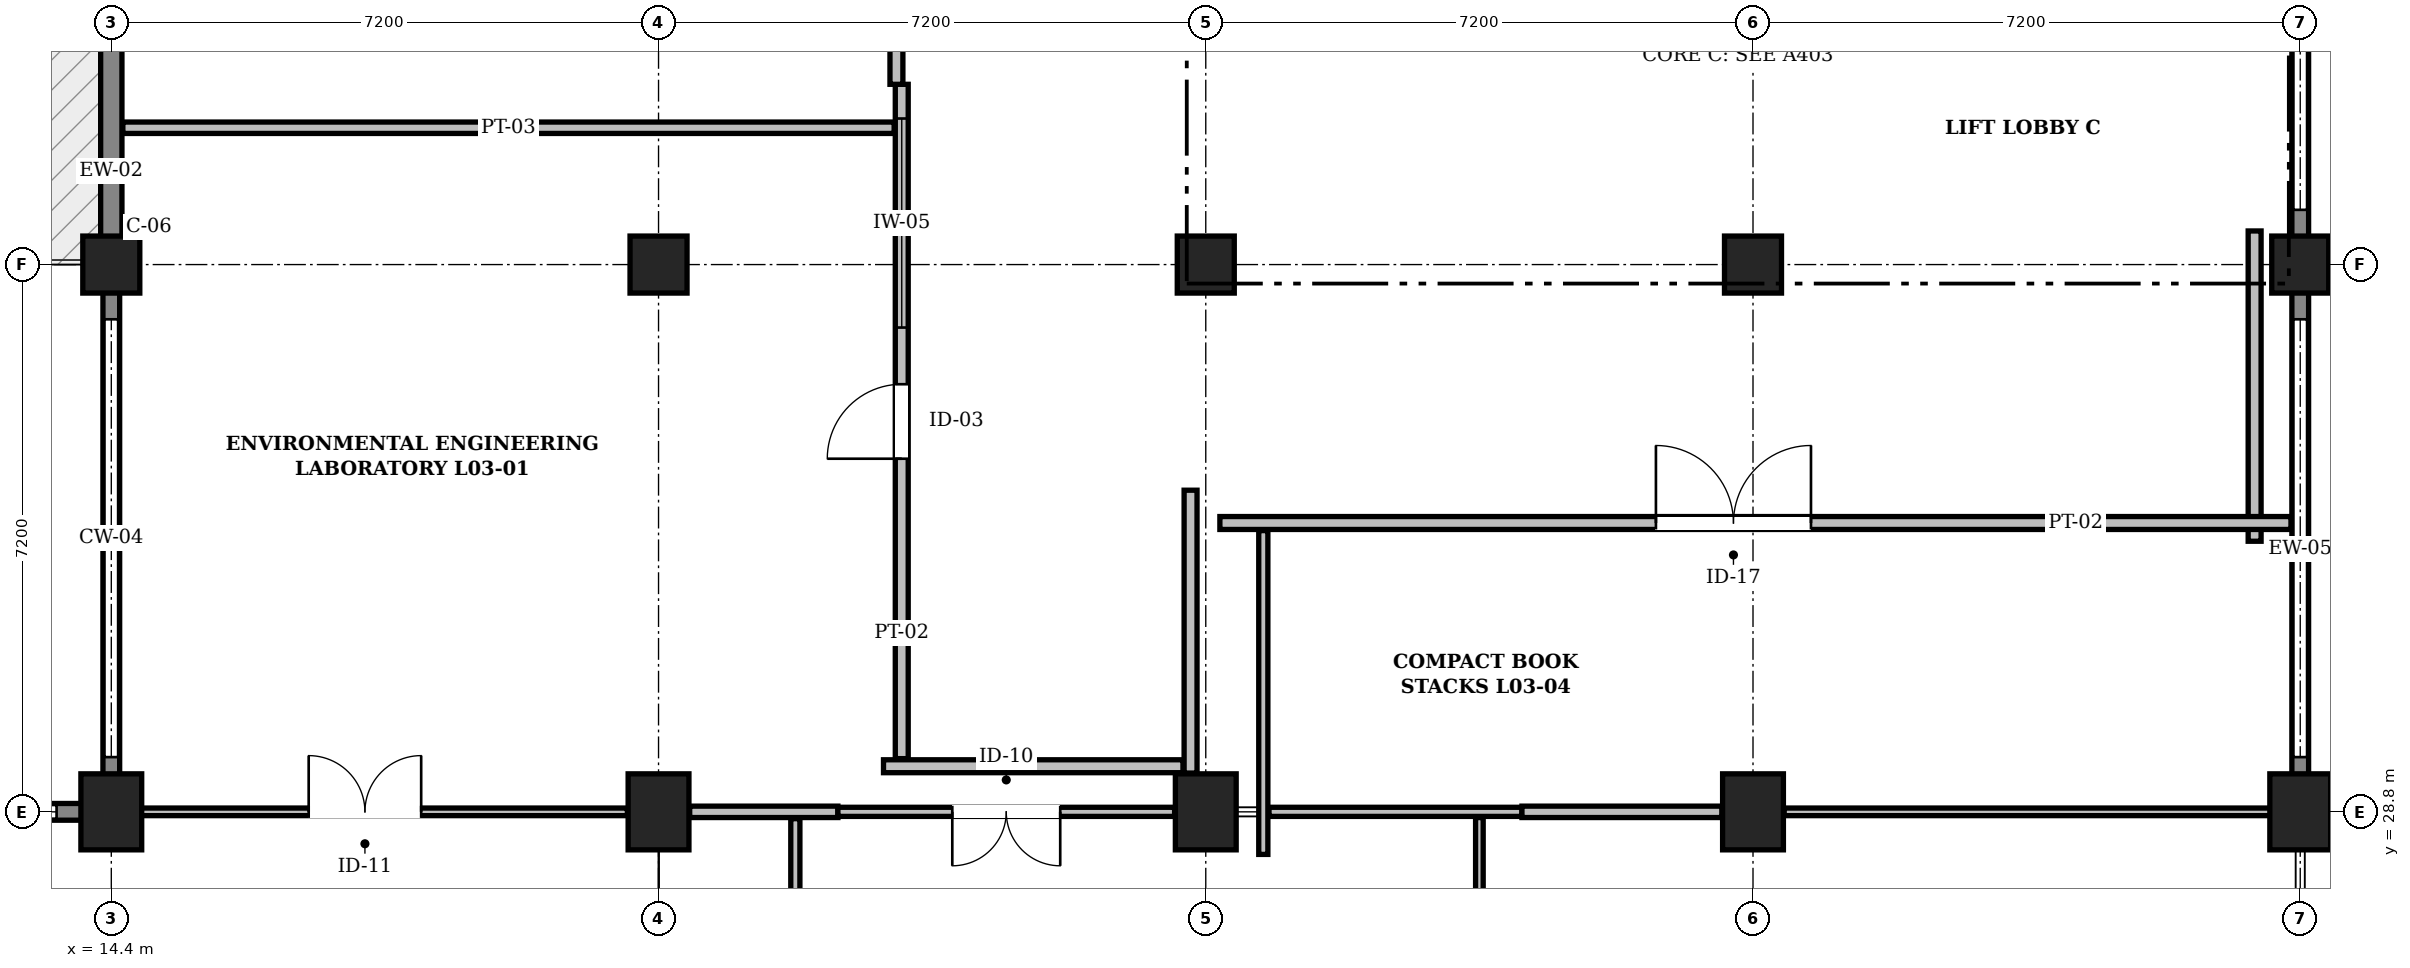
"""IFC4 building model, lengths in metres.
Left out: names, types, materials, properties, quantities, classifications, styles, units other than length and angle.
Written with IfcOpenShell. Run it as: python <this file> out.ifc"""

import sys

from ifc_helpers import new_model, si_unit, direction, frame, frame_2d, origin, origin_2d, place, context, subcontext, project, spatial, rectangle, extrude, element, fill, save


model = new_model("IFC4")
c1 = context("Model", 3, precision=1e-05, world=origin(), true_north=direction((0.0, 1.0)))
c2 = subcontext(c1, "Body", "Model", "MODEL_VIEW")
j1 = project(units=[si_unit("LENGTHUNIT", "METRE"), si_unit("PLANEANGLEUNIT", "RADIAN")], contexts=[c1])
p1 = place(None, origin())
s1 = spatial("IfcSite", under=j1, at=p1, CompositionType="ELEMENT")
p2 = place(p1, origin())
s2 = spatial("IfcBuilding", under=s1, at=p2, CompositionType="ELEMENT")
p3 = place(p2, frame((0.0, 0.0, 14.4)))
s3 = spatial("IfcBuildingStorey", under=s2, at=p3, CompositionType="ELEMENT", Elevation=14.4)
p4 = place(p3, frame((14.4, 28.8, 0.0), z_axis=(0.0, 0.0, 1.0), x_axis=(1.0, 0.0, 0.0)))
e1 = element("IfcColumn", 1, at=p4, inside=s3, PredefinedType="COLUMN", context=c2, shape_type="SweptSolid", body=[
    extrude(rectangle(XDim=0.8, YDim=1.0, at=origin_2d()), origin(), (0.0, 0.0, 1.0), 4.5),
])
p5 = place(p3, frame((14.4, 36.0, 0.0), z_axis=(0.0, 0.0, 1.0), x_axis=(1.0, 0.0, 0.0)))
e2 = element("IfcColumn", 2, at=p5, inside=s3, PredefinedType="COLUMN", context=c2, shape_type="SweptSolid", body=[
    extrude(rectangle(XDim=0.75, YDim=0.75, at=origin_2d()), origin(), (0.0, 0.0, 1.0), 4.5),
])
p6 = place(p3, frame((21.6, 28.8, 0.0), z_axis=(0.0, 0.0, 1.0), x_axis=(1.0, 0.0, 0.0)))
e3 = element("IfcColumn", 3, at=p6, inside=s3, PredefinedType="COLUMN", context=c2, shape_type="SweptSolid", body=[
    extrude(rectangle(XDim=0.8, YDim=1.0, at=origin_2d()), origin(), (0.0, 0.0, 1.0), 4.5),
])
p7 = place(p3, frame((21.6, 36.0, 0.0), z_axis=(0.0, 0.0, 1.0), x_axis=(1.0, 0.0, 0.0)))
e4 = element("IfcColumn", 4, at=p7, inside=s3, PredefinedType="COLUMN", context=c2, shape_type="SweptSolid", body=[
    extrude(rectangle(XDim=0.75, YDim=0.75, at=origin_2d()), origin(), (0.0, 0.0, 1.0), 4.5),
])
p8 = place(p3, frame((28.8, 28.8, 0.0), z_axis=(0.0, 0.0, 1.0), x_axis=(1.0, 0.0, 0.0)))
e5 = element("IfcColumn", 5, at=p8, inside=s3, PredefinedType="COLUMN", context=c2, shape_type="SweptSolid", body=[
    extrude(rectangle(XDim=0.8, YDim=1.0, at=origin_2d()), origin(), (0.0, 0.0, 1.0), 4.5),
])
p9 = place(p3, frame((28.8, 36.0, 0.0), z_axis=(0.0, 0.0, 1.0), x_axis=(1.0, 0.0, 0.0)))
e6 = element("IfcColumn", 6, at=p9, inside=s3, PredefinedType="COLUMN", context=c2, shape_type="SweptSolid", body=[
    extrude(rectangle(XDim=0.75, YDim=0.75, at=origin_2d()), origin(), (0.0, 0.0, 1.0), 4.5),
])
p10 = place(p3, frame((36.0, 28.8, 0.0), z_axis=(0.0, 0.0, 1.0), x_axis=(1.0, 0.0, 0.0)))
e7 = element("IfcColumn", 7, at=p10, inside=s3, PredefinedType="COLUMN", context=c2, shape_type="SweptSolid", body=[
    extrude(rectangle(XDim=0.8, YDim=1.0, at=origin_2d()), origin(), (0.0, 0.0, 1.0), 4.5),
])
p11 = place(p3, frame((36.0, 36.0, 0.0), z_axis=(0.0, 0.0, 1.0), x_axis=(1.0, 0.0, 0.0)))
e8 = element("IfcColumn", 8, at=p11, inside=s3, PredefinedType="COLUMN", context=c2, shape_type="SweptSolid", body=[
    extrude(rectangle(XDim=0.75, YDim=0.75, at=origin_2d()), origin(), (0.0, 0.0, 1.0), 4.5),
])
p12 = place(p3, frame((43.2, 28.8, 0.0), z_axis=(0.0, 0.0, 1.0), x_axis=(1.0, 0.0, 0.0)))
e9 = element("IfcColumn", 9, at=p12, inside=s3, PredefinedType="COLUMN", context=c2, shape_type="SweptSolid", body=[
    extrude(rectangle(XDim=0.8, YDim=1.0, at=origin_2d()), origin(), (0.0, 0.0, 1.0), 4.5),
])
p13 = place(p3, frame((43.2, 36.0, 0.0), z_axis=(0.0, 0.0, 1.0), x_axis=(1.0, 0.0, 0.0)))
e10 = element("IfcColumn", 10, at=p13, inside=s3, PredefinedType="COLUMN", context=c2, shape_type="SweptSolid", body=[
    extrude(rectangle(XDim=0.75, YDim=0.75, at=origin_2d()), origin(), (0.0, 0.0, 1.0), 4.5),
])
p14 = place(p3, frame((7.2, 28.8, 0.0), z_axis=(0.0, 0.0, 1.0), x_axis=(1.0, 0.0, 0.0)))
e11 = element("IfcWall", 11, at=p14, inside=s3, PredefinedType="SOLIDWALL", context=c2, shape_type="SweptSolid", body=[
    extrude(rectangle(XDim=7.35, YDim=0.22, at=frame_2d((3.675, 0.0))), origin(), (0.0, 0.0, 1.0), 1.24),
])
p15 = place(p3, frame((14.4, 28.966, 0.0), z_axis=(0.0, 0.0, 1.0), x_axis=(0.0, 1.0, 0.0)))
e12 = element("IfcWall", 12, at=p15, inside=s3, PredefinedType="SOLIDWALL", context=c2, shape_type="SweptSolid", body=[
    extrude(rectangle(XDim=7.034, YDim=0.22, at=frame_2d((3.517, 0.0))), origin(), (0.0, 0.0, 1.0), 1.24),
])
p16 = place(p3, frame((14.4, 36.0, 0.0), z_axis=(0.0, 0.0, 1.0), x_axis=(0.0, 1.0, 0.0)))
e13 = element("IfcWall", 13, at=p16, inside=s3, PredefinedType="SOLIDWALL", context=c2, shape_type="SweptSolid", body=[
    extrude(rectangle(XDim=7.2, YDim=0.28, at=frame_2d((3.6, 0.0))), origin(), (0.0, 0.0, 1.0), 4.22),
])
p17 = place(p16, frame((3.1, 0.0, 0.0)))
e14 = element("IfcOpeningElement", 14, at=p17, cuts=e13, PredefinedType="OPENING", context=c2, shape_type="SweptSolid", body=[
    extrude(rectangle(XDim=1.0, YDim=2.15, at=frame_2d((0.5, 1.075))), frame((0.0, 0.152, 0.0), z_axis=(0.0, -1.0, 0.0), x_axis=(1.0, 0.0, 0.0)), (0.0, 0.0, 1.0), 0.304),
])
p18 = place(p3, frame((43.2, 43.2, 0.0), z_axis=(0.0, 0.0, 1.0), x_axis=(0.0, -1.0, 0.0)))
e15 = element("IfcWall", 15, at=p18, inside=s3, PredefinedType="SOLIDWALL", context=c2, shape_type="SweptSolid", body=[
    extrude(rectangle(XDim=7.2, YDim=0.22, at=frame_2d((3.6, 0.0))), origin(), (0.0, 0.0, 1.0), 1.24),
])
p19 = place(p3, frame((43.2, 36.0, 0.0), z_axis=(0.0, 0.0, 1.0), x_axis=(0.0, -1.0, 0.0)))
e16 = element("IfcWall", 16, at=p19, inside=s3, PredefinedType="SOLIDWALL", context=c2, shape_type="SweptSolid", body=[
    extrude(rectangle(XDim=7.034, YDim=0.22, at=frame_2d((3.517, 0.0))), origin(), (0.0, 0.0, 1.0), 1.24),
])
p20 = place(p3, frame((43.05, 28.8, 0.0), z_axis=(0.0, 0.0, 1.0), x_axis=(1.0, 0.0, 0.0)))
e17 = element("IfcWall", 17, at=p20, inside=s3, PredefinedType="SOLIDWALL", context=c2, shape_type="SweptSolid", body=[
    extrude(rectangle(XDim=7.35, YDim=0.22, at=frame_2d((3.675, 0.0))), origin(), (0.0, 0.0, 1.0), 1.24),
])
p21 = place(p3, frame((28.6, 29.31, 0.0), z_axis=(0.0, 0.0, 1.0), x_axis=(0.0, 1.0, 0.0)))
e18 = element("IfcWall", 18, at=p21, inside=s3, PredefinedType="PARTITIONING", context=c2, shape_type="SweptSolid", body=[
    extrude(rectangle(XDim=3.721, YDim=0.17, at=frame_2d((1.861, 0.0))), origin(), (0.0, 0.0, 1.0), 3.73),
])
p22 = place(p3, frame((24.56, 29.4, 0.0), z_axis=(0.0, 0.0, 1.0), x_axis=(1.0, 0.0, 0.0)))
e19 = element("IfcWall", 19, at=p22, inside=s3, PredefinedType="PARTITIONING", context=c2, shape_type="SweptSolid", body=[
    extrude(rectangle(XDim=3.94, YDim=0.17, at=frame_2d((1.97, 0.0))), origin(), (0.0, 0.0, 1.0), 4.16),
])
p23 = place(p3, frame((24.8, 29.5, 0.0), z_axis=(0.0, 0.0, 1.0), x_axis=(0.0, 1.0, 0.0)))
e20 = element("IfcWall", 20, at=p23, inside=s3, PredefinedType="PARTITIONING", context=c2, shape_type="SweptSolid", body=[
    extrude(rectangle(XDim=8.872, YDim=0.17, at=frame_2d((4.436, 0.0))), origin(), (0.0, 0.0, 1.0), 4.16),
])
p24 = place(p23, frame((3.946, 0.0, 0.0)))
e21 = element("IfcOpeningElement", 21, at=p24, cuts=e20, PredefinedType="OPENING", context=c2, shape_type="SweptSolid", body=[
    extrude(rectangle(XDim=0.98, YDim=2.14, at=frame_2d((0.49, 1.07))), frame((0.0, 0.097, 0.0), z_axis=(0.0, -1.0, 0.0), x_axis=(1.0, 0.0, 0.0)), (0.0, 0.0, 1.0), 0.194),
])
p25 = place(p23, frame((5.671, 0.0, 1.05)))
e22 = element("IfcOpeningElement", 22, at=p25, cuts=e20, PredefinedType="OPENING", context=c2, shape_type="SweptSolid", body=[
    extrude(rectangle(XDim=2.75, YDim=1.15, at=frame_2d((1.375, 0.575))), frame((0.0, 0.097, 0.0), z_axis=(0.0, -1.0, 0.0), x_axis=(1.0, 0.0, 0.0)), (0.0, 0.0, 1.0), 0.194),
])
p26 = place(p3, frame((24.73, 38.372, 0.0), z_axis=(0.0, 0.0, 1.0), x_axis=(0.0, 1.0, 0.0)))
e23 = element("IfcWall", 23, at=p26, inside=s3, PredefinedType="PARTITIONING", context=c2, shape_type="SweptSolid", body=[
    extrude(rectangle(XDim=18.778, YDim=0.17, at=frame_2d((9.389, 0.0))), origin(), (0.0, 0.0, 1.0), 4.16),
])
p27 = place(p26, frame((8.549, 0.0, 0.0)))
e24 = element("IfcOpeningElement", 24, at=p27, cuts=e23, PredefinedType="OPENING", context=c2, shape_type="SweptSolid", body=[
    extrude(rectangle(XDim=1.68, YDim=2.28, at=frame_2d((0.84, 1.14))), frame((0.0, 0.097, 0.0), z_axis=(0.0, -1.0, 0.0), x_axis=(1.0, 0.0, 0.0)), (0.0, 0.0, 1.0), 0.194),
])
p28 = place(p3, frame((42.6, 32.36, 0.0), z_axis=(0.0, 0.0, 1.0), x_axis=(0.0, 1.0, 0.0)))
e25 = element("IfcWall", 25, at=p28, inside=s3, PredefinedType="PARTITIONING", context=c2, shape_type="SweptSolid", body=[
    extrude(rectangle(XDim=4.082, YDim=0.17, at=frame_2d((2.041, 0.0))), origin(), (0.0, 0.0, 1.0), 4.16),
])
p29 = place(p3, frame((28.986, 32.6, 0.0), z_axis=(0.0, 0.0, 1.0), x_axis=(1.0, 0.0, 0.0)))
e26 = element("IfcWall", 26, at=p29, inside=s3, PredefinedType="PARTITIONING", context=c2, shape_type="SweptSolid", body=[
    extrude(rectangle(XDim=14.092, YDim=0.17, at=frame_2d((7.046, 0.0))), origin(), (0.0, 0.0, 1.0), 4.16),
])
p30 = place(p29, frame((5.737, 0.0, 0.0)))
e27 = element("IfcOpeningElement", 27, at=p30, cuts=e26, PredefinedType="OPENING", context=c2, shape_type="SweptSolid", body=[
    extrude(rectangle(XDim=2.04, YDim=2.34, at=frame_2d((1.02, 1.17))), frame((0.0, 0.097, 0.0), z_axis=(0.0, -1.0, 0.0), x_axis=(1.0, 0.0, 0.0)), (0.0, 0.0, 1.0), 0.194),
])
p31 = place(p3, frame((14.552, 37.8, 0.0), z_axis=(0.0, 0.0, 1.0), x_axis=(1.0, 0.0, 0.0)))
e28 = element("IfcWall", 28, at=p31, inside=s3, PredefinedType="PARTITIONING", context=c2, shape_type="SweptSolid", body=[
    extrude(rectangle(XDim=10.148, YDim=0.15, at=frame_2d((5.074, 0.0))), origin(), (0.0, 0.0, 1.0), 4.16),
])
p32 = place(p3, frame((29.557, 28.24, 0.0), z_axis=(0.0, 0.0, 1.0), x_axis=(0.0, 1.0, 0.0)))
e29 = element("IfcWall", 29, at=p32, inside=s3, PredefinedType="PARTITIONING", context=c2, shape_type="SweptSolid", body=[
    extrude(rectangle(XDim=4.26, YDim=0.12, at=frame_2d((2.13, 0.0))), origin(), (0.0, 0.0, 1.0), 4.16),
])
p33 = place(p3, frame((14.562, 28.8, 0.0), z_axis=(0.0, 0.0, 1.0), x_axis=(1.0, 0.0, 0.0)))
e30 = element("IfcWall", 30, at=p33, inside=s3, PredefinedType="PARTITIONING", context=c2, shape_type="SweptSolid", body=[
    extrude(rectangle(XDim=6.628, YDim=0.1, at=frame_2d((3.314, 0.0))), origin(), (0.0, 0.0, 1.0), 3.7),
])
p34 = place(p33, frame((2.435, 0.0, 0.0)))
e31 = element("IfcOpeningElement", 31, at=p34, cuts=e30, PredefinedType="OPENING", context=c2, shape_type="SweptSolid", body=[
    extrude(rectangle(XDim=1.48, YDim=2.26, at=frame_2d((0.74, 1.13))), frame((0.0, 0.062, 0.0), z_axis=(0.0, -1.0, 0.0), x_axis=(1.0, 0.0, 0.0)), (0.0, 0.0, 1.0), 0.124),
])
p35 = place(p3, frame((22.01, 28.8, 0.0), z_axis=(0.0, 0.0, 1.0), x_axis=(1.0, 0.0, 0.0)))
e32 = element("IfcWall", 32, at=p35, inside=s3, PredefinedType="PARTITIONING", context=c2, shape_type="SweptSolid", body=[
    extrude(rectangle(XDim=1.95, YDim=0.15, at=frame_2d((0.975, 0.0))), origin(), (0.0, 0.0, 1.0), 2.78),
])
p36 = place(p3, frame((23.96, 28.8, 0.0), z_axis=(0.0, 0.0, 1.0), x_axis=(1.0, 0.0, 0.0)))
e33 = element("IfcWall", 33, at=p36, inside=s3, PredefinedType="PARTITIONING", context=c2, shape_type="SweptSolid", body=[
    extrude(rectangle(XDim=4.43, YDim=0.12, at=frame_2d((2.215, 0.0))), origin(), (0.0, 0.0, 1.0), 2.78),
])
p37 = place(p36, frame((1.505, 0.0, 0.0)))
e34 = element("IfcOpeningElement", 34, at=p37, cuts=e33, PredefinedType="OPENING", context=c2, shape_type="SweptSolid", body=[
    extrude(rectangle(XDim=1.42, YDim=2.24, at=frame_2d((0.71, 1.12))), frame((0.0, 0.072, 0.0), z_axis=(0.0, -1.0, 0.0), x_axis=(1.0, 0.0, 0.0)), (0.0, 0.0, 1.0), 0.144),
])
p38 = place(p3, frame((29.632, 28.8, 0.0), z_axis=(0.0, 0.0, 1.0), x_axis=(1.0, 0.0, 0.0)))
e35 = element("IfcWall", 35, at=p38, inside=s3, PredefinedType="PARTITIONING", context=c2, shape_type="SweptSolid", body=[
    extrude(rectangle(XDim=3.328, YDim=0.12, at=frame_2d((1.664, 0.0))), origin(), (0.0, 0.0, 1.0), 3.7),
])
p39 = place(p3, frame((36.41, 28.8, 0.0), z_axis=(0.0, 0.0, 1.0), x_axis=(1.0, 0.0, 0.0)))
e36 = element("IfcWall", 36, at=p39, inside=s3, PredefinedType="PARTITIONING", context=c2, shape_type="SweptSolid", body=[
    extrude(rectangle(XDim=6.628, YDim=0.1, at=frame_2d((3.314, 0.0))), origin(), (0.0, 0.0, 1.0), 3.7),
])
p40 = place(p3, frame((32.96, 28.8, 0.0), z_axis=(0.0, 0.0, 1.0), x_axis=(1.0, 0.0, 0.0)))
e37 = element("IfcWall", 37, at=p40, inside=s3, PredefinedType="PARTITIONING", context=c2, shape_type="SweptSolid", body=[
    extrude(rectangle(XDim=2.63, YDim=0.15, at=frame_2d((1.315, 0.0))), origin(), (0.0, 0.0, 1.0), 3.7),
])
p41 = place(p3, frame((23.4, 17.53, 0.0), z_axis=(0.0, 0.0, 1.0), x_axis=(0.0, 1.0, 0.0)))
e38 = element("IfcWall", 38, at=p41, inside=s3, PredefinedType="PARTITIONING", context=c2, shape_type="SweptSolid", body=[
    extrude(rectangle(XDim=11.18, YDim=0.12, at=frame_2d((5.59, 0.0))), origin(), (0.0, 0.0, 1.0), 4.16),
])
p42 = place(p3, frame((32.4, 14.577, 0.0), z_axis=(0.0, 0.0, 1.0), x_axis=(0.0, 1.0, 0.0)))
e39 = element("IfcWall", 39, at=p42, inside=s3, PredefinedType="PARTITIONING", context=c2, shape_type="SweptSolid", body=[
    extrude(rectangle(XDim=14.148, YDim=0.1, at=frame_2d((7.074, 0.0))), origin(), (0.0, 0.0, 1.0), 4.16),
])
p43 = place(p42, frame((6.32, 0.0, 0.0)))
e40 = element("IfcOpeningElement", 40, at=p43, cuts=e39, PredefinedType="OPENING", context=c2, shape_type="SweptSolid", body=[
    extrude(rectangle(XDim=1.34, YDim=2.24, at=frame_2d((0.67, 1.12))), frame((0.0, 0.062, 0.0), z_axis=(0.0, -1.0, 0.0), x_axis=(1.0, 0.0, 0.0)), (0.0, 0.0, 1.0), 0.124),
])
p44 = place(p24, origin())
e41 = element("IfcDoor", 41, at=p44, inside=s3, OperationType="SINGLE_SWING_LEFT", PredefinedType="DOOR", context=c2, shape_type="SweptSolid", body=[
    extrude(rectangle(XDim=0.98, YDim=2.14, at=frame_2d((0.49, 1.07))), frame((0.0, 0.025, 0.0), z_axis=(0.0, -1.0, 0.0), x_axis=(1.0, 0.0, 0.0)), (0.0, 0.0, 1.0), 0.05),
])
fill(e21, e41)
p45 = place(p25, origin())
e42 = element("IfcWindow", 42, at=p45, inside=s3, PartitioningType="SINGLE_PANEL", PredefinedType="WINDOW", context=c2, shape_type="SweptSolid", body=[
    extrude(rectangle(XDim=2.75, YDim=1.15, at=frame_2d((1.375, 0.575))), frame((0.0, 0.03, 0.0), z_axis=(0.0, -1.0, 0.0), x_axis=(1.0, 0.0, 0.0)), (0.0, 0.0, 1.0), 0.06),
])
fill(e22, e42)
p46 = place(p34, origin())
e43 = element("IfcDoor", 43, at=p46, inside=s3, OperationType="DOUBLE_DOOR_SINGLE_SWING", PredefinedType="DOOR", context=c2, shape_type="SweptSolid", body=[
    extrude(rectangle(XDim=1.48, YDim=2.26, at=frame_2d((0.74, 1.13))), frame((0.0, 0.025, 0.0), z_axis=(0.0, -1.0, 0.0), x_axis=(1.0, 0.0, 0.0)), (0.0, 0.0, 1.0), 0.05),
])
fill(e31, e43)
p47 = place(p30, origin())
e44 = element("IfcDoor", 44, at=p47, inside=s3, OperationType="DOUBLE_DOOR_SINGLE_SWING", PredefinedType="DOOR", context=c2, shape_type="SweptSolid", body=[
    extrude(rectangle(XDim=2.04, YDim=2.34, at=frame_2d((1.02, 1.17))), frame((0.0, 0.025, 0.0), z_axis=(0.0, -1.0, 0.0), x_axis=(1.0, 0.0, 0.0)), (0.0, 0.0, 1.0), 0.05),
])
fill(e27, e44)
p48 = place(p37, frame((1.42, 0.0, 0.0), z_axis=(0.0, 0.0, 1.0), x_axis=(-1.0, 0.0, 0.0)))
e45 = element("IfcDoor", 45, at=p48, inside=s3, OperationType="DOUBLE_DOOR_SINGLE_SWING", PredefinedType="DOOR", context=c2, shape_type="SweptSolid", body=[
    extrude(rectangle(XDim=1.42, YDim=2.24, at=frame_2d((0.71, 1.12))), frame((0.0, 0.025, 0.0), z_axis=(0.0, -1.0, 0.0), x_axis=(1.0, 0.0, 0.0)), (0.0, 0.0, 1.0), 0.05),
])
fill(e34, e45)
save(model, sys.argv[1])
